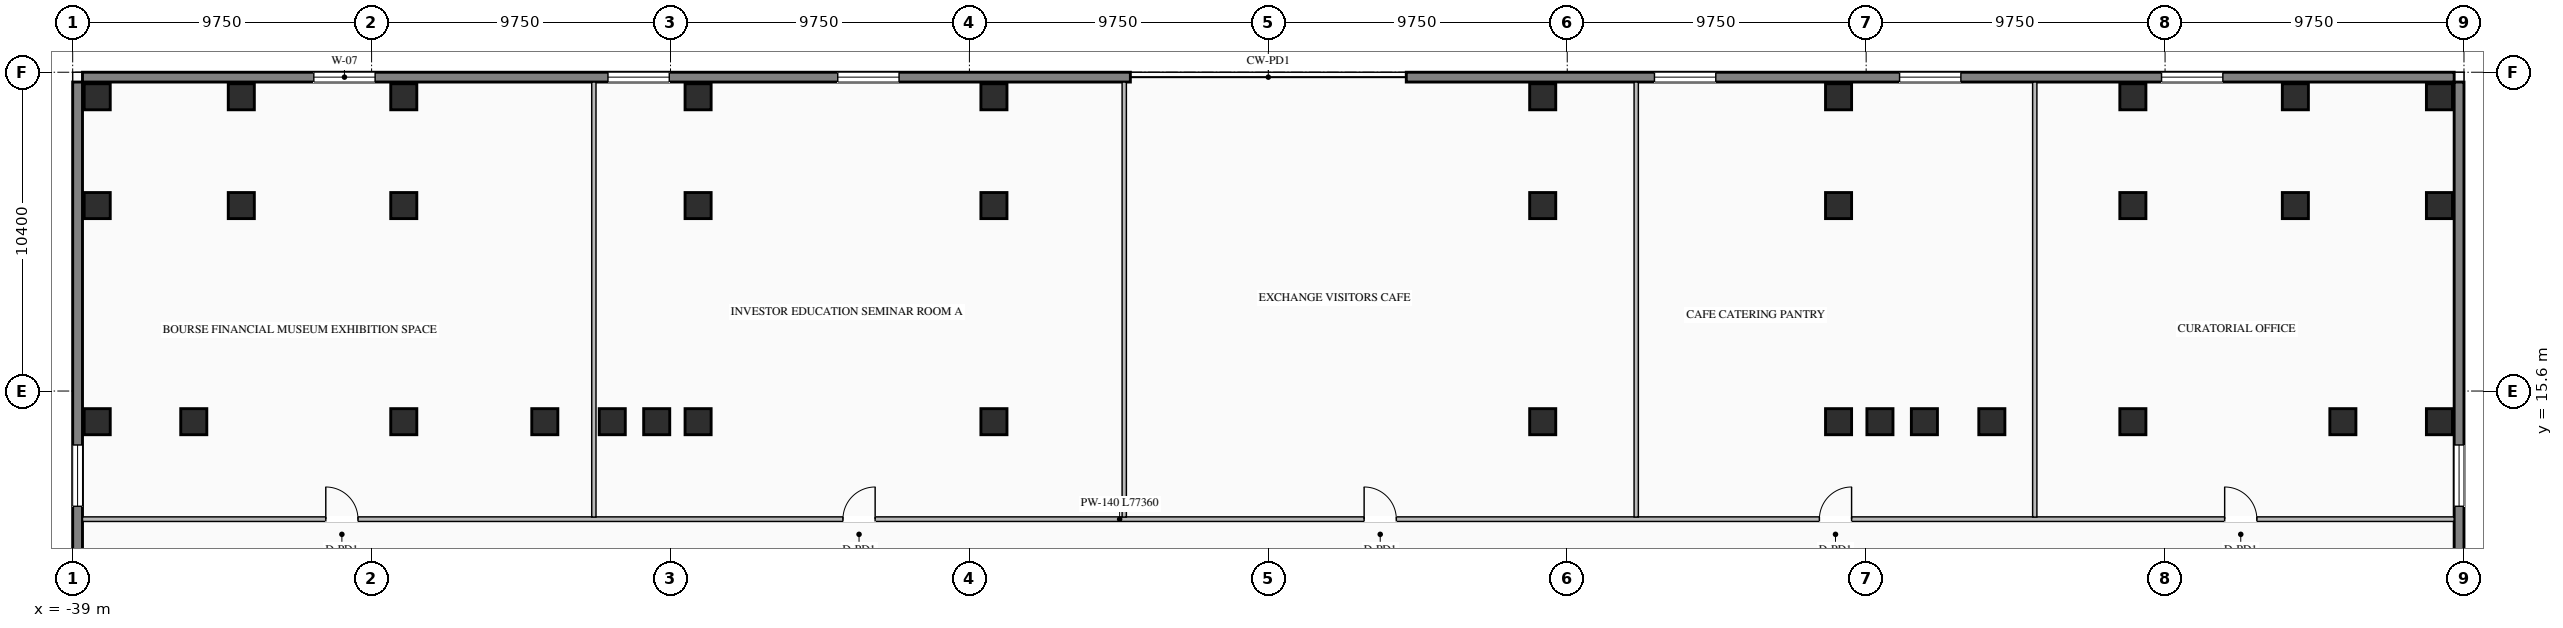
"""IFC4 building model, lengths in metres.
Left out: names, types, materials, properties, quantities, classifications, styles, units other than length and angle.
Written with IfcOpenShell. Run it as: python <this file> out.ifc"""

import sys

from ifc_helpers import new_model, si_unit, direction, frame, frame_2d, origin, origin_2d, place, context, subcontext, project, spatial, rectangle, i_section, extrude, element, fill, save


model = new_model("IFC4")
c1 = context("Model", 3, precision=1e-05, world=origin(), true_north=direction((0.0, 1.0)))
c2 = subcontext(c1, "Body", "Model", "MODEL_VIEW")
j1 = project(units=[si_unit("LENGTHUNIT", "METRE"), si_unit("PLANEANGLEUNIT", "RADIAN")], contexts=[c1])
p1 = place(None, origin())
s1 = spatial("IfcSite", under=j1, at=p1, CompositionType="ELEMENT")
p2 = place(p1, origin())
s2 = spatial("IfcBuilding", under=s1, at=p2, CompositionType="ELEMENT")
p3 = place(p2, frame((0.0, 0.0, 9.6)))
s3 = spatial("IfcBuildingStorey", under=s2, at=p3, CompositionType="ELEMENT", Elevation=9.6)
for number, where, z_axis, x_axis in (
    (1, (-21.4, 14.6, 0.0), (0.0, 0.0, 1.0), (1.0, 0.0, 0.0)),
    (2, (-19.95, 14.6, 0.0), (0.0, 0.0, 1.0), (1.0, 0.0, 0.0)),
    (3, (-18.6, 14.6, 0.0), (0.0, 0.0, 1.0), (1.0, 0.0, 0.0)),
    (4, (-8.95, 14.6, 0.0), (0.0, 0.0, 1.0), (1.0, 0.0, 0.0)),
    (5, (8.95, 14.6, 0.0), (0.0, 0.0, 1.0), (1.0, 0.0, 0.0)),
    (6, (18.6, 14.6, 0.0), (0.0, 0.0, 1.0), (1.0, 0.0, 0.0)),
    (7, (19.95, 14.6, 0.0), (0.0, 0.0, 1.0), (1.0, 0.0, 0.0)),
    (8, (21.4, 14.6, 0.0), (0.0, 0.0, 1.0), (1.0, 0.0, 0.0)),
    (9, (-23.6, 14.6, 0.0), (0.0, 0.0, 1.0), (1.0, 0.0, 0.0)),
    (10, (23.6, 14.6, 0.0), (0.0, 0.0, 1.0), (1.0, 0.0, 0.0)),
    (11, (-28.2, 14.6, 0.0), (0.0, 0.0, 1.0), (1.0, 0.0, 0.0)),
    (12, (28.2, 14.6, 0.0), (0.0, 0.0, 1.0), (1.0, 0.0, 0.0)),
    (13, (-35.05, 14.6, 0.0), (0.0, 0.0, 1.0), (1.0, 0.0, 0.0)),
    (14, (35.05, 14.6, 0.0), (0.0, 0.0, 1.0), (1.0, 0.0, 0.0)),
    (15, (-38.2, 21.65, 0.0), (0.0, 0.0, 1.0), (1.0, 0.0, 0.0)),
    (16, (-33.5, 21.65, 0.0), (0.0, 0.0, 1.0), (1.0, 0.0, 0.0)),
    (17, (-28.2, 21.65, 0.0), (0.0, 0.0, 1.0), (1.0, 0.0, 0.0)),
    (18, (-18.6, 21.65, 0.0), (0.0, 0.0, 1.0), (1.0, 0.0, 0.0)),
    (19, (-8.95, 21.65, 0.0), (0.0, 0.0, 1.0), (1.0, 0.0, 0.0)),
    (20, (8.95, 21.65, 0.0), (0.0, 0.0, 1.0), (1.0, 0.0, 0.0)),
    (21, (18.6, 21.65, 0.0), (0.0, 0.0, 1.0), (1.0, 0.0, 0.0)),
    (22, (28.2, 21.65, 0.0), (0.0, 0.0, 1.0), (1.0, 0.0, 0.0)),
    (23, (33.5, 21.65, 0.0), (0.0, 0.0, 1.0), (1.0, 0.0, 0.0)),
    (24, (38.2, 21.65, 0.0), (0.0, 0.0, 1.0), (1.0, 0.0, 0.0)),
    (25, (-38.2, 25.2, 0.0), (0.0, 0.0, 1.0), (1.0, 0.0, 0.0)),
    (26, (-33.5, 25.2, 0.0), (0.0, 0.0, 1.0), (1.0, 0.0, 0.0)),
    (27, (-28.2, 25.2, 0.0), (0.0, 0.0, 1.0), (1.0, 0.0, 0.0)),
    (28, (-18.6, 25.2, 0.0), (0.0, 0.0, 1.0), (1.0, 0.0, 0.0)),
    (29, (-8.95, 25.2, 0.0), (0.0, 0.0, 1.0), (1.0, 0.0, 0.0)),
    (30, (8.95, 25.2, 0.0), (0.0, 0.0, 1.0), (1.0, 0.0, 0.0)),
    (31, (18.6, 25.2, 0.0), (0.0, 0.0, 1.0), (1.0, 0.0, 0.0)),
    (32, (28.2, 25.2, 0.0), (0.0, 0.0, 1.0), (1.0, 0.0, 0.0)),
    (33, (33.5, 25.2, 0.0), (0.0, 0.0, 1.0), (1.0, 0.0, 0.0)),
    (34, (38.2, 25.2, 0.0), (0.0, 0.0, 1.0), (1.0, 0.0, 0.0)),
    (35, (-38.2, 14.6, 0.0), (0.0, 0.0, 1.0), (1.0, 0.0, 0.0)),
    (36, (38.2, 14.6, 0.0), (0.0, 0.0, 1.0), (1.0, 0.0, 0.0)),
):
    element("IfcColumn", number, at=place(p3, frame(where, z_axis=z_axis, x_axis=x_axis)), inside=s3, PredefinedType="COLUMN", context=c2, shape_type="SweptSolid", body=[
        extrude(i_section(OverallWidth=0.85, OverallDepth=0.85, WebThickness=0.032, FlangeThickness=0.048, at=origin_2d()), origin(), (0.0, 0.0, 1.0), 4.5),
    ])
p4 = place(p3, frame((-38.68, 25.84, 0.0), z_axis=(0.0, 0.0, 1.0), x_axis=(1.0, 0.0, 0.0)))
e37 = element("IfcWall", 37, at=p4, inside=s3, PredefinedType="STANDARD", context=c2, shape_type="SweptSolid", body=[
    extrude(rectangle(XDim=34.18, YDim=0.32, at=frame_2d((17.09, 0.0))), origin(), (0.0, 0.0, 1.0), 4.23),
])
p5 = place(p4, frame((7.545, 0.0, 0.8)))
e38 = element("IfcOpeningElement", 38, at=p5, cuts=e37, PredefinedType="OPENING", context=c2, shape_type="SweptSolid", body=[
    extrude(rectangle(XDim=2.0, YDim=2.2, at=frame_2d((1.0, 1.1))), frame((0.0, 0.17, 0.0), z_axis=(0.0, -1.0, 0.0), x_axis=(1.0, 0.0, 0.0)), (0.0, 0.0, 1.0), 0.34),
])
p6 = place(p4, frame((17.14, 0.0, 0.8)))
e39 = element("IfcOpeningElement", 39, at=p6, cuts=e37, PredefinedType="OPENING", context=c2, shape_type="SweptSolid", body=[
    extrude(rectangle(XDim=2.0, YDim=2.2, at=frame_2d((1.0, 1.1))), frame((0.0, 0.17, 0.0), z_axis=(0.0, -1.0, 0.0), x_axis=(1.0, 0.0, 0.0)), (0.0, 0.0, 1.0), 0.34),
])
p7 = place(p4, frame((24.635, 0.0, 0.8)))
e40 = element("IfcOpeningElement", 40, at=p7, cuts=e37, PredefinedType="OPENING", context=c2, shape_type="SweptSolid", body=[
    extrude(rectangle(XDim=2.0, YDim=2.2, at=frame_2d((1.0, 1.1))), frame((0.0, 0.17, 0.0), z_axis=(0.0, -1.0, 0.0), x_axis=(1.0, 0.0, 0.0)), (0.0, 0.0, 1.0), 0.34),
])
p8 = place(p3, frame((4.5, 25.84, 0.0), z_axis=(0.0, 0.0, 1.0), x_axis=(1.0, 0.0, 0.0)))
e41 = element("IfcWall", 41, at=p8, inside=s3, PredefinedType="STANDARD", context=c2, shape_type="SweptSolid", body=[
    extrude(rectangle(XDim=34.18, YDim=0.32, at=frame_2d((17.09, 0.0))), origin(), (0.0, 0.0, 1.0), 4.23),
])
p9 = place(p8, frame((8.095, 0.0, 0.8)))
e42 = element("IfcOpeningElement", 42, at=p9, cuts=e41, PredefinedType="OPENING", context=c2, shape_type="SweptSolid", body=[
    extrude(rectangle(XDim=2.0, YDim=2.2, at=frame_2d((1.0, 1.1))), frame((0.0, 0.17, 0.0), z_axis=(0.0, -1.0, 0.0), x_axis=(1.0, 0.0, 0.0)), (0.0, 0.0, 1.0), 0.34),
])
p10 = place(p8, frame((16.09, 0.0, 0.8)))
e43 = element("IfcOpeningElement", 43, at=p10, cuts=e41, PredefinedType="OPENING", context=c2, shape_type="SweptSolid", body=[
    extrude(rectangle(XDim=2.0, YDim=2.2, at=frame_2d((1.0, 1.1))), frame((0.0, 0.17, 0.0), z_axis=(0.0, -1.0, 0.0), x_axis=(1.0, 0.0, 0.0)), (0.0, 0.0, 1.0), 0.34),
])
p11 = place(p8, frame((24.635, 0.0, 0.8)))
e44 = element("IfcOpeningElement", 44, at=p11, cuts=e41, PredefinedType="OPENING", context=c2, shape_type="SweptSolid", body=[
    extrude(rectangle(XDim=2.0, YDim=2.2, at=frame_2d((1.0, 1.1))), frame((0.0, 0.17, 0.0), z_axis=(0.0, -1.0, 0.0), x_axis=(1.0, 0.0, 0.0)), (0.0, 0.0, 1.0), 0.34),
])
p12 = place(p3, frame((-38.84, -25.68, 0.0), z_axis=(0.0, 0.0, 1.0), x_axis=(0.0, 1.0, 0.0)))
e45 = element("IfcWall", 45, at=p12, inside=s3, PredefinedType="STANDARD", context=c2, shape_type="SweptSolid", body=[
    extrude(rectangle(XDim=51.36, YDim=0.32, at=frame_2d((25.68, 0.0))), origin(), (0.0, 0.0, 1.0), 4.23),
])
p13 = place(p12, frame((11.84, 0.0, 0.8)))
e46 = element("IfcOpeningElement", 46, at=p13, cuts=e45, PredefinedType="OPENING", context=c2, shape_type="SweptSolid", body=[
    extrude(rectangle(XDim=2.0, YDim=2.2, at=frame_2d((1.0, 1.1))), frame((0.0, 0.17, 0.0), z_axis=(0.0, -1.0, 0.0), x_axis=(1.0, 0.0, 0.0)), (0.0, 0.0, 1.0), 0.34),
])
p14 = place(p12, frame((24.68, 0.0, 0.8)))
e47 = element("IfcOpeningElement", 47, at=p14, cuts=e45, PredefinedType="OPENING", context=c2, shape_type="SweptSolid", body=[
    extrude(rectangle(XDim=2.0, YDim=2.2, at=frame_2d((1.0, 1.1))), frame((0.0, 0.17, 0.0), z_axis=(0.0, -1.0, 0.0), x_axis=(1.0, 0.0, 0.0)), (0.0, 0.0, 1.0), 0.34),
])
p15 = place(p12, frame((37.52, 0.0, 0.8)))
e48 = element("IfcOpeningElement", 48, at=p15, cuts=e45, PredefinedType="OPENING", context=c2, shape_type="SweptSolid", body=[
    extrude(rectangle(XDim=2.0, YDim=2.2, at=frame_2d((1.0, 1.1))), frame((0.0, 0.17, 0.0), z_axis=(0.0, -1.0, 0.0), x_axis=(1.0, 0.0, 0.0)), (0.0, 0.0, 1.0), 0.34),
])
p16 = place(p3, frame((38.84, 25.68, 0.0), z_axis=(0.0, 0.0, 1.0), x_axis=(0.0, -1.0, 0.0)))
e49 = element("IfcWall", 49, at=p16, inside=s3, PredefinedType="STANDARD", context=c2, shape_type="SweptSolid", body=[
    extrude(rectangle(XDim=51.36, YDim=0.32, at=frame_2d((25.68, 0.0))), origin(), (0.0, 0.0, 1.0), 4.23),
])
p17 = place(p16, frame((11.84, 0.0, 0.8)))
e50 = element("IfcOpeningElement", 50, at=p17, cuts=e49, PredefinedType="OPENING", context=c2, shape_type="SweptSolid", body=[
    extrude(rectangle(XDim=2.0, YDim=2.2, at=frame_2d((1.0, 1.1))), frame((0.0, 0.17, 0.0), z_axis=(0.0, -1.0, 0.0), x_axis=(1.0, 0.0, 0.0)), (0.0, 0.0, 1.0), 0.34),
])
p18 = place(p16, frame((24.68, 0.0, 0.8)))
e51 = element("IfcOpeningElement", 51, at=p18, cuts=e49, PredefinedType="OPENING", context=c2, shape_type="SweptSolid", body=[
    extrude(rectangle(XDim=2.0, YDim=2.2, at=frame_2d((1.0, 1.1))), frame((0.0, 0.17, 0.0), z_axis=(0.0, -1.0, 0.0), x_axis=(1.0, 0.0, 0.0)), (0.0, 0.0, 1.0), 0.34),
])
p19 = place(p16, frame((37.52, 0.0, 0.8)))
e52 = element("IfcOpeningElement", 52, at=p19, cuts=e49, PredefinedType="OPENING", context=c2, shape_type="SweptSolid", body=[
    extrude(rectangle(XDim=2.0, YDim=2.2, at=frame_2d((1.0, 1.1))), frame((0.0, 0.17, 0.0), z_axis=(0.0, -1.0, 0.0), x_axis=(1.0, 0.0, 0.0)), (0.0, 0.0, 1.0), 0.34),
])
p20 = place(p3, frame((-38.68, 11.42, 0.0), z_axis=(0.0, 0.0, 1.0), x_axis=(1.0, 0.0, 0.0)))
e53 = element("IfcWall", 53, at=p20, inside=s3, PredefinedType="STANDARD", context=c2, shape_type="SweptSolid", body=[
    extrude(rectangle(XDim=77.36, YDim=0.15, at=frame_2d((38.68, 0.0))), origin(), (0.0, 0.0, 1.0), 4.23),
])
p21 = place(p20, frame((7.936, 0.0, 0.0)))
e54 = element("IfcOpeningElement", 54, at=p21, cuts=e53, PredefinedType="OPENING", context=c2, shape_type="SweptSolid", body=[
    extrude(rectangle(XDim=1.05, YDim=2.08, at=frame_2d((0.525, 1.04))), frame((0.0, 0.085, 0.0), z_axis=(0.0, -1.0, 0.0), x_axis=(1.0, 0.0, 0.0)), (0.0, 0.0, 1.0), 0.17),
])
p22 = place(p20, frame((24.805, 0.0, 0.0)))
e55 = element("IfcOpeningElement", 55, at=p22, cuts=e53, PredefinedType="OPENING", context=c2, shape_type="SweptSolid", body=[
    extrude(rectangle(XDim=1.05, YDim=2.08, at=frame_2d((0.525, 1.04))), frame((0.0, 0.085, 0.0), z_axis=(0.0, -1.0, 0.0), x_axis=(1.0, 0.0, 0.0)), (0.0, 0.0, 1.0), 0.17),
])
p23 = place(p20, frame((41.805, 0.0, 0.0)))
e56 = element("IfcOpeningElement", 56, at=p23, cuts=e53, PredefinedType="OPENING", context=c2, shape_type="SweptSolid", body=[
    extrude(rectangle(XDim=1.05, YDim=2.08, at=frame_2d((0.525, 1.04))), frame((0.0, 0.085, 0.0), z_axis=(0.0, -1.0, 0.0), x_axis=(1.0, 0.0, 0.0)), (0.0, 0.0, 1.0), 0.17),
])
p24 = place(p20, frame((56.655, 0.0, 0.0)))
e57 = element("IfcOpeningElement", 57, at=p24, cuts=e53, PredefinedType="OPENING", context=c2, shape_type="SweptSolid", body=[
    extrude(rectangle(XDim=1.05, YDim=2.08, at=frame_2d((0.525, 1.04))), frame((0.0, 0.085, 0.0), z_axis=(0.0, -1.0, 0.0), x_axis=(1.0, 0.0, 0.0)), (0.0, 0.0, 1.0), 0.17),
])
p25 = place(p20, frame((69.874, 0.0, 0.0)))
e58 = element("IfcOpeningElement", 58, at=p25, cuts=e53, PredefinedType="OPENING", context=c2, shape_type="SweptSolid", body=[
    extrude(rectangle(XDim=1.05, YDim=2.08, at=frame_2d((0.525, 1.04))), frame((0.0, 0.085, 0.0), z_axis=(0.0, -1.0, 0.0), x_axis=(1.0, 0.0, 0.0)), (0.0, 0.0, 1.0), 0.17),
])
for number, where, z_axis, x_axis in (
    (59, (-22.0, 11.49, 0.0), (0.0, 0.0, 1.0), (0.0, 1.0, 0.0)),
    (60, (-4.7, 11.49, 0.0), (0.0, 0.0, 1.0), (0.0, 1.0, 0.0)),
    (61, (12.0, 11.49, 0.0), (0.0, 0.0, 1.0), (0.0, 1.0, 0.0)),
    (62, (25.0, 11.49, 0.0), (0.0, 0.0, 1.0), (0.0, 1.0, 0.0)),
):
    element("IfcWall", number, at=place(p3, frame(where, z_axis=z_axis, x_axis=x_axis)), inside=s3, PredefinedType="STANDARD", context=c2, shape_type="SweptSolid", body=[
        extrude(rectangle(XDim=14.19, YDim=0.14, at=frame_2d((7.095, 0.0))), origin(), (0.0, 0.0, 1.0), 4.23),
    ])
p26 = place(p5, origin())
e63 = element("IfcWindow", 63, at=p26, inside=s3, PartitioningType="DOUBLE_PANEL_VERTICAL", PredefinedType="WINDOW", context=c2, shape_type="SweptSolid", body=[
    extrude(rectangle(XDim=2.0, YDim=2.2, at=frame_2d((1.0, 1.1))), frame((0.0, 0.03, 0.0), z_axis=(0.0, -1.0, 0.0), x_axis=(1.0, 0.0, 0.0)), (0.0, 0.0, 1.0), 0.06),
])
fill(e38, e63)
p27 = place(p6, origin())
e64 = element("IfcWindow", 64, at=p27, inside=s3, PartitioningType="DOUBLE_PANEL_VERTICAL", PredefinedType="WINDOW", context=c2, shape_type="SweptSolid", body=[
    extrude(rectangle(XDim=2.0, YDim=2.2, at=frame_2d((1.0, 1.1))), frame((0.0, 0.03, 0.0), z_axis=(0.0, -1.0, 0.0), x_axis=(1.0, 0.0, 0.0)), (0.0, 0.0, 1.0), 0.06),
])
fill(e39, e64)
p28 = place(p7, origin())
e65 = element("IfcWindow", 65, at=p28, inside=s3, PartitioningType="DOUBLE_PANEL_VERTICAL", PredefinedType="WINDOW", context=c2, shape_type="SweptSolid", body=[
    extrude(rectangle(XDim=2.0, YDim=2.2, at=frame_2d((1.0, 1.1))), frame((0.0, 0.03, 0.0), z_axis=(0.0, -1.0, 0.0), x_axis=(1.0, 0.0, 0.0)), (0.0, 0.0, 1.0), 0.06),
])
fill(e40, e65)
p29 = place(p9, origin())
e66 = element("IfcWindow", 66, at=p29, inside=s3, PartitioningType="DOUBLE_PANEL_VERTICAL", PredefinedType="WINDOW", context=c2, shape_type="SweptSolid", body=[
    extrude(rectangle(XDim=2.0, YDim=2.2, at=frame_2d((1.0, 1.1))), frame((0.0, 0.03, 0.0), z_axis=(0.0, -1.0, 0.0), x_axis=(1.0, 0.0, 0.0)), (0.0, 0.0, 1.0), 0.06),
])
fill(e42, e66)
p30 = place(p10, origin())
e67 = element("IfcWindow", 67, at=p30, inside=s3, PartitioningType="DOUBLE_PANEL_VERTICAL", PredefinedType="WINDOW", context=c2, shape_type="SweptSolid", body=[
    extrude(rectangle(XDim=2.0, YDim=2.2, at=frame_2d((1.0, 1.1))), frame((0.0, 0.03, 0.0), z_axis=(0.0, -1.0, 0.0), x_axis=(1.0, 0.0, 0.0)), (0.0, 0.0, 1.0), 0.06),
])
fill(e43, e67)
p31 = place(p11, origin())
e68 = element("IfcWindow", 68, at=p31, inside=s3, PartitioningType="DOUBLE_PANEL_VERTICAL", PredefinedType="WINDOW", context=c2, shape_type="SweptSolid", body=[
    extrude(rectangle(XDim=2.0, YDim=2.2, at=frame_2d((1.0, 1.1))), frame((0.0, 0.03, 0.0), z_axis=(0.0, -1.0, 0.0), x_axis=(1.0, 0.0, 0.0)), (0.0, 0.0, 1.0), 0.06),
])
fill(e44, e68)
p32 = place(p15, origin())
e69 = element("IfcWindow", 69, at=p32, inside=s3, PartitioningType="DOUBLE_PANEL_VERTICAL", PredefinedType="WINDOW", context=c2, shape_type="SweptSolid", body=[
    extrude(rectangle(XDim=2.0, YDim=2.2, at=frame_2d((1.0, 1.1))), frame((0.0, 0.03, 0.0), z_axis=(0.0, -1.0, 0.0), x_axis=(1.0, 0.0, 0.0)), (0.0, 0.0, 1.0), 0.06),
])
fill(e48, e69)
p33 = place(p17, origin())
e70 = element("IfcWindow", 70, at=p33, inside=s3, PartitioningType="DOUBLE_PANEL_VERTICAL", PredefinedType="WINDOW", context=c2, shape_type="SweptSolid", body=[
    extrude(rectangle(XDim=2.0, YDim=2.2, at=frame_2d((1.0, 1.1))), frame((0.0, 0.03, 0.0), z_axis=(0.0, -1.0, 0.0), x_axis=(1.0, 0.0, 0.0)), (0.0, 0.0, 1.0), 0.06),
])
fill(e50, e70)
p34 = place(p21, origin())
e71 = element("IfcDoor", 71, at=p34, inside=s3, OperationType="SINGLE_SWING_LEFT", PredefinedType="DOOR", context=c2, shape_type="SweptSolid", body=[
    extrude(rectangle(XDim=1.05, YDim=2.08, at=frame_2d((0.525, 1.04))), frame((0.0, 0.025, 0.0), z_axis=(0.0, -1.0, 0.0), x_axis=(1.0, 0.0, 0.0)), (0.0, 0.0, 1.0), 0.05),
])
fill(e54, e71)
p35 = place(p22, origin())
e72 = element("IfcDoor", 72, at=p35, inside=s3, OperationType="SINGLE_SWING_RIGHT", PredefinedType="DOOR", context=c2, shape_type="SweptSolid", body=[
    extrude(rectangle(XDim=1.05, YDim=2.08, at=frame_2d((0.525, 1.04))), frame((0.0, 0.025, 0.0), z_axis=(0.0, -1.0, 0.0), x_axis=(1.0, 0.0, 0.0)), (0.0, 0.0, 1.0), 0.05),
])
fill(e55, e72)
p36 = place(p23, origin())
e73 = element("IfcDoor", 73, at=p36, inside=s3, OperationType="SINGLE_SWING_LEFT", PredefinedType="DOOR", context=c2, shape_type="SweptSolid", body=[
    extrude(rectangle(XDim=1.05, YDim=2.08, at=frame_2d((0.525, 1.04))), frame((0.0, 0.025, 0.0), z_axis=(0.0, -1.0, 0.0), x_axis=(1.0, 0.0, 0.0)), (0.0, 0.0, 1.0), 0.05),
])
fill(e56, e73)
p37 = place(p24, origin())
e74 = element("IfcDoor", 74, at=p37, inside=s3, OperationType="SINGLE_SWING_RIGHT", PredefinedType="DOOR", context=c2, shape_type="SweptSolid", body=[
    extrude(rectangle(XDim=1.05, YDim=2.08, at=frame_2d((0.525, 1.04))), frame((0.0, 0.025, 0.0), z_axis=(0.0, -1.0, 0.0), x_axis=(1.0, 0.0, 0.0)), (0.0, 0.0, 1.0), 0.05),
])
fill(e57, e74)
p38 = place(p25, origin())
e75 = element("IfcDoor", 75, at=p38, inside=s3, OperationType="SINGLE_SWING_LEFT", PredefinedType="DOOR", context=c2, shape_type="SweptSolid", body=[
    extrude(rectangle(XDim=1.05, YDim=2.08, at=frame_2d((0.525, 1.04))), frame((0.0, 0.025, 0.0), z_axis=(0.0, -1.0, 0.0), x_axis=(1.0, 0.0, 0.0)), (0.0, 0.0, 1.0), 0.05),
])
fill(e58, e75)
save(model, sys.argv[1])
